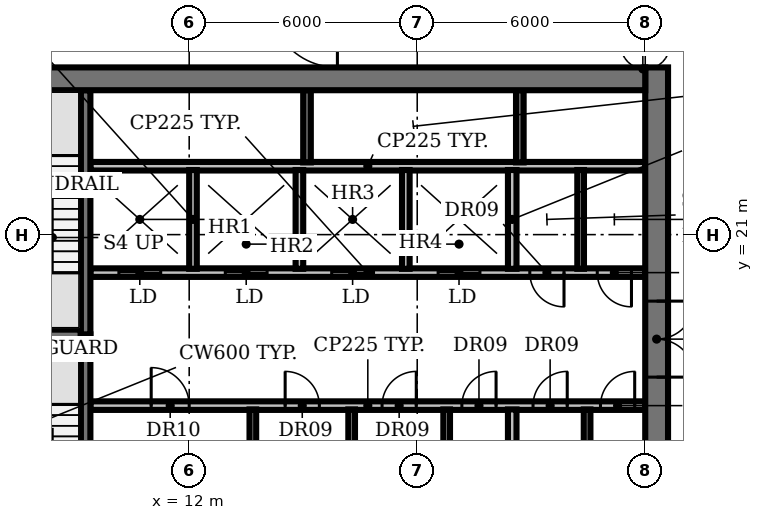
"""IFC4 building model, lengths in metres.
Left out: names, types, materials, properties, quantities, classifications, styles, units other than length and angle.
Written with IfcOpenShell. Run it as: python <this file> out.ifc"""

import sys

from ifc_helpers import new_model, si_unit, direction, frame, frame_2d, origin, place, context, subcontext, project, spatial, rectangle, extrude, element, fill, save


model = new_model("IFC4")
c1 = context("Model", 3, precision=1e-05, world=origin(), true_north=direction((0.0, 1.0)))
c2 = subcontext(c1, "Body", "Model", "MODEL_VIEW")
j1 = project(units=[si_unit("LENGTHUNIT", "METRE"), si_unit("PLANEANGLEUNIT", "RADIAN")], contexts=[c1])
p1 = place(None, origin())
s1 = spatial("IfcSite", under=j1, at=p1, CompositionType="ELEMENT")
p2 = place(p1, origin())
s2 = spatial("IfcBuilding", under=s1, at=p2, CompositionType="ELEMENT")
p3 = place(p2, frame((0.0, 0.0, 197.0)))
s3 = spatial("IfcBuildingStorey", under=s2, at=p3, CompositionType="ELEMENT", Elevation=197.0)
p4 = place(p3, frame((9.4, 16.5, 0.0), z_axis=(0.0, 0.0, 1.0), x_axis=(1.0, 0.0, 0.0)))
e1 = element("IfcWall", 1, at=p4, inside=s3, PredefinedType="PARTITIONING", context=c2, shape_type="SweptSolid", body=[
    extrude(rectangle(XDim=14.6, YDim=0.225, at=frame_2d((7.3, 0.0))), origin(), (0.0, 0.0, 1.0), 8.05),
])
p5 = place(p4, frame((1.6, 0.0, 0.0)))
e2 = element("IfcOpeningElement", 2, at=p5, cuts=e1, PredefinedType="OPENING", context=c2, shape_type="SweptSolid", body=[
    extrude(rectangle(XDim=1.0, YDim=2.1, at=frame_2d((0.5, 1.05))), frame((0.0, 0.123, 0.0), z_axis=(0.0, -1.0, 0.0), x_axis=(1.0, 0.0, 0.0)), (0.0, 0.0, 1.0), 0.245),
])
p6 = place(p4, frame((5.125, 0.0, 0.0)))
e3 = element("IfcOpeningElement", 3, at=p6, cuts=e1, PredefinedType="OPENING", context=c2, shape_type="SweptSolid", body=[
    extrude(rectangle(XDim=0.9, YDim=2.1, at=frame_2d((0.45, 1.05))), frame((0.0, 0.123, 0.0), z_axis=(0.0, -1.0, 0.0), x_axis=(1.0, 0.0, 0.0)), (0.0, 0.0, 1.0), 0.245),
])
p7 = place(p4, frame((7.675, 0.0, 0.0)))
e4 = element("IfcOpeningElement", 4, at=p7, cuts=e1, PredefinedType="OPENING", context=c2, shape_type="SweptSolid", body=[
    extrude(rectangle(XDim=0.9, YDim=2.1, at=frame_2d((0.45, 1.05))), frame((0.0, 0.123, 0.0), z_axis=(0.0, -1.0, 0.0), x_axis=(1.0, 0.0, 0.0)), (0.0, 0.0, 1.0), 0.245),
])
p8 = place(p4, frame((9.775, 0.0, 0.0)))
e5 = element("IfcOpeningElement", 5, at=p8, cuts=e1, PredefinedType="OPENING", context=c2, shape_type="SweptSolid", body=[
    extrude(rectangle(XDim=0.9, YDim=2.1, at=frame_2d((0.45, 1.05))), frame((0.0, 0.123, 0.0), z_axis=(0.0, -1.0, 0.0), x_axis=(1.0, 0.0, 0.0)), (0.0, 0.0, 1.0), 0.245),
])
p9 = place(p4, frame((11.647, 0.0, 0.0)))
e6 = element("IfcOpeningElement", 6, at=p9, cuts=e1, PredefinedType="OPENING", context=c2, shape_type="SweptSolid", body=[
    extrude(rectangle(XDim=0.9, YDim=2.1, at=frame_2d((0.45, 1.05))), frame((0.0, 0.123, 0.0), z_axis=(0.0, -1.0, 0.0), x_axis=(1.0, 0.0, 0.0)), (0.0, 0.0, 1.0), 0.245),
])
p10 = place(p4, frame((13.423, 0.0, 0.0)))
e7 = element("IfcOpeningElement", 7, at=p10, cuts=e1, PredefinedType="OPENING", context=c2, shape_type="SweptSolid", body=[
    extrude(rectangle(XDim=0.9, YDim=2.1, at=frame_2d((0.45, 1.05))), frame((0.0, 0.123, 0.0), z_axis=(0.0, -1.0, 0.0), x_axis=(1.0, 0.0, 0.0)), (0.0, 0.0, 1.0), 0.245),
])
p11 = place(p3, frame((6.0, 18.375, 0.0), z_axis=(0.0, 0.0, 1.0), x_axis=(1.0, 0.0, 0.0)))
e8 = element("IfcWall", 8, at=p11, inside=s3, PredefinedType="SHEAR", context=c2, shape_type="SweptSolid", body=[
    extrude(rectangle(XDim=3.15, YDim=0.25, at=frame_2d((1.575, 0.0))), origin(), (0.0, 0.0, 1.0), 8.05),
])
p12 = place(p3, frame((24.0, 20.0, 0.0), z_axis=(0.0, 0.0, 1.0), x_axis=(-1.0, 0.0, 0.0)))
e9 = element("IfcWall", 9, at=p12, inside=s3, PredefinedType="PARTITIONING", context=c2, shape_type="SweptSolid", body=[
    extrude(rectangle(XDim=14.6, YDim=0.225, at=frame_2d((7.3, 0.0))), origin(), (0.0, 0.0, 1.0), 8.05),
])
p13 = place(p12, frame((12.75, 0.0, 0.0)))
e10 = element("IfcOpeningElement", 10, at=p13, cuts=e9, PredefinedType="OPENING", context=c2, shape_type="SweptSolid", body=[
    extrude(rectangle(XDim=1.1, YDim=2.1, at=frame_2d((0.55, 1.05))), frame((0.0, 0.123, 0.0), z_axis=(0.0, -1.0, 0.0), x_axis=(1.0, 0.0, 0.0)), (0.0, 0.0, 1.0), 0.245),
])
p14 = place(p12, frame((9.95, 0.0, 0.0)))
e11 = element("IfcOpeningElement", 11, at=p14, cuts=e9, PredefinedType="OPENING", context=c2, shape_type="SweptSolid", body=[
    extrude(rectangle(XDim=1.1, YDim=2.1, at=frame_2d((0.55, 1.05))), frame((0.0, 0.123, 0.0), z_axis=(0.0, -1.0, 0.0), x_axis=(1.0, 0.0, 0.0)), (0.0, 0.0, 1.0), 0.245),
])
p15 = place(p12, frame((7.15, 0.0, 0.0)))
e12 = element("IfcOpeningElement", 12, at=p15, cuts=e9, PredefinedType="OPENING", context=c2, shape_type="SweptSolid", body=[
    extrude(rectangle(XDim=1.1, YDim=2.1, at=frame_2d((0.55, 1.05))), frame((0.0, 0.123, 0.0), z_axis=(0.0, -1.0, 0.0), x_axis=(1.0, 0.0, 0.0)), (0.0, 0.0, 1.0), 0.245),
])
p16 = place(p12, frame((4.35, 0.0, 0.0)))
e13 = element("IfcOpeningElement", 13, at=p16, cuts=e9, PredefinedType="OPENING", context=c2, shape_type="SweptSolid", body=[
    extrude(rectangle(XDim=1.1, YDim=2.1, at=frame_2d((0.55, 1.05))), frame((0.0, 0.123, 0.0), z_axis=(0.0, -1.0, 0.0), x_axis=(1.0, 0.0, 0.0)), (0.0, 0.0, 1.0), 0.245),
])
p17 = place(p12, frame((2.137, 0.0, 0.0)))
e14 = element("IfcOpeningElement", 14, at=p17, cuts=e9, PredefinedType="OPENING", context=c2, shape_type="SweptSolid", body=[
    extrude(rectangle(XDim=0.9, YDim=2.1, at=frame_2d((0.45, 1.05))), frame((0.0, 0.123, 0.0), z_axis=(0.0, -1.0, 0.0), x_axis=(1.0, 0.0, 0.0)), (0.0, 0.0, 1.0), 0.245),
])
p18 = place(p12, frame((0.363, 0.0, 0.0)))
e15 = element("IfcOpeningElement", 15, at=p18, cuts=e9, PredefinedType="OPENING", context=c2, shape_type="SweptSolid", body=[
    extrude(rectangle(XDim=0.9, YDim=2.1, at=frame_2d((0.45, 1.05))), frame((0.0, 0.123, 0.0), z_axis=(0.0, -1.0, 0.0), x_axis=(1.0, 0.0, 0.0)), (0.0, 0.0, 1.0), 0.245),
])
p19 = place(p3, frame((9.4, 22.8, 0.0), z_axis=(0.0, 0.0, 1.0), x_axis=(1.0, 0.0, 0.0)))
e16 = element("IfcWall", 16, at=p19, inside=s3, PredefinedType="PARTITIONING", context=c2, shape_type="SweptSolid", body=[
    extrude(rectangle(XDim=14.6, YDim=0.225, at=frame_2d((7.3, 0.0))), origin(), (0.0, 0.0, 1.0), 8.05),
])
p20 = place(p3, frame((9.275, 18.375, 0.0), z_axis=(0.0, 0.0, 1.0), x_axis=(0.0, -1.0, 0.0)))
e17 = element("IfcWall", 17, at=p20, inside=s3, PredefinedType="SHEAR", context=c2, shape_type="SweptSolid", body=[
    extrude(rectangle(XDim=6.55, YDim=0.25, at=frame_2d((3.275, 0.0))), origin(), (0.0, 0.0, 1.0), 8.05),
])
p21 = place(p20, frame((5.075, 0.0, 0.0)))
e18 = element("IfcOpeningElement", 18, at=p21, cuts=e17, PredefinedType="OPENING", context=c2, shape_type="SweptSolid", body=[
    extrude(rectangle(XDim=1.0, YDim=2.1, at=frame_2d((0.5, 1.05))), frame((0.0, 0.135, 0.0), z_axis=(0.0, -1.0, 0.0), x_axis=(1.0, 0.0, 0.0)), (0.0, 0.0, 1.0), 0.27),
])
p22 = place(p3, frame((9.275, 18.375, 0.0), z_axis=(0.0, 0.0, 1.0), x_axis=(0.0, 1.0, 0.0)))
e19 = element("IfcWall", 19, at=p22, inside=s3, PredefinedType="SHEAR", context=c2, shape_type="SweptSolid", body=[
    extrude(rectangle(XDim=6.425, YDim=0.25, at=frame_2d((3.212, 0.0))), origin(), (0.0, 0.0, 1.0), 8.05),
])
p23 = place(p3, frame((12.1, 20.1, 0.0), z_axis=(0.0, 0.0, 1.0), x_axis=(0.0, 1.0, 0.0)))
e20 = element("IfcWall", 20, at=p23, inside=s3, PredefinedType="SOLIDWALL", context=c2, shape_type="SweptSolid", body=[
    extrude(rectangle(XDim=2.6, YDim=0.2, at=frame_2d((1.3, 0.0))), origin(), (0.0, 0.0, 1.0), 8.05),
])
p24 = place(p3, frame((13.675, 13.8, 0.0), z_axis=(0.0, 0.0, 1.0), x_axis=(0.0, 1.0, 0.0)))
e21 = element("IfcWall", 21, at=p24, inside=s3, PredefinedType="PARTITIONING", context=c2, shape_type="SweptSolid", body=[
    extrude(rectangle(XDim=2.6, YDim=0.175, at=frame_2d((1.3, 0.0))), origin(), (0.0, 0.0, 1.0), 8.05),
])
p25 = place(p3, frame((14.9, 20.1, 0.0), z_axis=(0.0, 0.0, 1.0), x_axis=(0.0, 1.0, 0.0)))
e22 = element("IfcWall", 22, at=p25, inside=s3, PredefinedType="SOLIDWALL", context=c2, shape_type="SweptSolid", body=[
    extrude(rectangle(XDim=2.6, YDim=0.2, at=frame_2d((1.3, 0.0))), origin(), (0.0, 0.0, 1.0), 8.05),
])
p26 = place(p3, frame((15.1, 22.9, 0.0), z_axis=(0.0, 0.0, 1.0), x_axis=(0.0, 1.0, 0.0)))
e23 = element("IfcWall", 23, at=p26, inside=s3, PredefinedType="SHEAR", context=c2, shape_type="SweptSolid", body=[
    extrude(rectangle(XDim=1.9, YDim=0.2, at=frame_2d((0.95, 0.0))), origin(), (0.0, 0.0, 1.0), 8.05),
])
p27 = place(p3, frame((16.275, 13.8, 0.0), z_axis=(0.0, 0.0, 1.0), x_axis=(0.0, 1.0, 0.0)))
e24 = element("IfcWall", 24, at=p27, inside=s3, PredefinedType="PARTITIONING", context=c2, shape_type="SweptSolid", body=[
    extrude(rectangle(XDim=2.6, YDim=0.175, at=frame_2d((1.3, 0.0))), origin(), (0.0, 0.0, 1.0), 8.05),
])
p28 = place(p3, frame((17.7, 20.1, 0.0), z_axis=(0.0, 0.0, 1.0), x_axis=(0.0, 1.0, 0.0)))
e25 = element("IfcWall", 25, at=p28, inside=s3, PredefinedType="SOLIDWALL", context=c2, shape_type="SweptSolid", body=[
    extrude(rectangle(XDim=2.6, YDim=0.2, at=frame_2d((1.3, 0.0))), origin(), (0.0, 0.0, 1.0), 8.05),
])
p29 = place(p3, frame((18.775, 13.8, 0.0), z_axis=(0.0, 0.0, 1.0), x_axis=(0.0, 1.0, 0.0)))
e26 = element("IfcWall", 26, at=p29, inside=s3, PredefinedType="PARTITIONING", context=c2, shape_type="SweptSolid", body=[
    extrude(rectangle(XDim=2.6, YDim=0.175, at=frame_2d((1.3, 0.0))), origin(), (0.0, 0.0, 1.0), 8.05),
])
for number, where, z_axis, x_axis in (
    (27, (20.5, 13.8, 0.0), (0.0, 0.0, 1.0), (0.0, 1.0, 0.0)),
    (28, (20.5, 20.1, 0.0), (0.0, 0.0, 1.0), (0.0, 1.0, 0.0)),
):
    element("IfcWall", number, at=place(p3, frame(where, z_axis=z_axis, x_axis=x_axis)), inside=s3, PredefinedType="PARTITIONING", context=c2, shape_type="SweptSolid", body=[
        extrude(rectangle(XDim=2.6, YDim=0.225, at=frame_2d((1.3, 0.0))), origin(), (0.0, 0.0, 1.0), 8.05),
    ])
p30 = place(p3, frame((20.7, 22.9, 0.0), z_axis=(0.0, 0.0, 1.0), x_axis=(0.0, 1.0, 0.0)))
e29 = element("IfcWall", 29, at=p30, inside=s3, PredefinedType="SHEAR", context=c2, shape_type="SweptSolid", body=[
    extrude(rectangle(XDim=1.9, YDim=0.2, at=frame_2d((0.95, 0.0))), origin(), (0.0, 0.0, 1.0), 8.05),
])
for number, where, z_axis, x_axis in (
    (30, (22.3, 20.1, 0.0), (0.0, 0.0, 1.0), (0.0, 1.0, 0.0)),
    (31, (22.47, 13.8, 0.0), (0.0, 0.0, 1.0), (0.0, 1.0, 0.0)),
):
    element("IfcWall", number, at=place(p3, frame(where, z_axis=z_axis, x_axis=x_axis)), inside=s3, PredefinedType="PARTITIONING", context=c2, shape_type="SweptSolid", body=[
        extrude(rectangle(XDim=2.6, YDim=0.175, at=frame_2d((1.3, 0.0))), origin(), (0.0, 0.0, 1.0), 8.05),
    ])
p31 = place(p3, frame((24.3, 25.4, 0.0), z_axis=(0.0, 0.0, 1.0), x_axis=(0.0, -1.0, 0.0)))
e32 = element("IfcWall", 32, at=p31, inside=s3, PredefinedType="SHEAR", context=c2, shape_type="SweptSolid", body=[
    extrude(rectangle(XDim=20.6, YDim=0.6, at=frame_2d((10.3, 0.0))), origin(), (0.0, 0.0, 1.0), 8.05),
])
p32 = place(p31, frame((18.25, 0.0, 0.0)))
e33 = element("IfcOpeningElement", 33, at=p32, cuts=e32, PredefinedType="OPENING", context=c2, shape_type="SweptSolid", body=[
    extrude(rectangle(XDim=1.5, YDim=2.1, at=frame_2d((0.75, 1.05))), frame((0.0, 0.31, 0.0), z_axis=(0.0, -1.0, 0.0), x_axis=(1.0, 0.0, 0.0)), (0.0, 0.0, 1.0), 0.62),
])
p33 = place(p31, frame((12.15, 0.0, 0.0)))
e34 = element("IfcOpeningElement", 34, at=p33, cuts=e32, PredefinedType="OPENING", context=c2, shape_type="SweptSolid", body=[
    extrude(rectangle(XDim=0.9, YDim=2.1, at=frame_2d((0.45, 1.05))), frame((0.0, 0.31, 0.0), z_axis=(0.0, -1.0, 0.0), x_axis=(1.0, 0.0, 0.0)), (0.0, 0.0, 1.0), 0.62),
])
p34 = place(p31, frame((6.15, 0.0, 0.0)))
e35 = element("IfcOpeningElement", 35, at=p34, cuts=e32, PredefinedType="OPENING", context=c2, shape_type="SweptSolid", body=[
    extrude(rectangle(XDim=2.0, YDim=2.1, at=frame_2d((1.0, 1.05))), frame((0.0, 0.31, 0.0), z_axis=(0.0, -1.0, 0.0), x_axis=(1.0, 0.0, 0.0)), (0.0, 0.0, 1.0), 0.62),
])
p35 = place(p3, frame((6.0, 25.1, 0.0), z_axis=(0.0, 0.0, 1.0), x_axis=(1.0, 0.0, 0.0)))
e36 = element("IfcWall", 36, at=p35, inside=s3, PredefinedType="SHEAR", context=c2, shape_type="SweptSolid", body=[
    extrude(rectangle(XDim=18.0, YDim=0.6, at=frame_2d((9.0, 0.0))), origin(), (0.0, 0.0, 1.0), 8.05),
])
p36 = place(p5, origin())
e37 = element("IfcDoor", 37, at=p36, inside=s3, OperationType="SINGLE_SWING_LEFT", PredefinedType="DOOR", context=c2, shape_type="SweptSolid", body=[
    extrude(rectangle(XDim=1.0, YDim=2.1, at=frame_2d((0.5, 1.05))), frame((0.0, 0.025, 0.0), z_axis=(0.0, -1.0, 0.0), x_axis=(1.0, 0.0, 0.0)), (0.0, 0.0, 1.0), 0.05),
])
fill(e2, e37)
p37 = place(p6, origin())
e38 = element("IfcDoor", 38, at=p37, inside=s3, OperationType="SINGLE_SWING_LEFT", PredefinedType="DOOR", context=c2, shape_type="SweptSolid", body=[
    extrude(rectangle(XDim=0.9, YDim=2.1, at=frame_2d((0.45, 1.05))), frame((0.0, 0.025, 0.0), z_axis=(0.0, -1.0, 0.0), x_axis=(1.0, 0.0, 0.0)), (0.0, 0.0, 1.0), 0.05),
])
fill(e3, e38)
p38 = place(p7, origin())
e39 = element("IfcDoor", 39, at=p38, inside=s3, OperationType="SINGLE_SWING_RIGHT", PredefinedType="DOOR", context=c2, shape_type="SweptSolid", body=[
    extrude(rectangle(XDim=0.9, YDim=2.1, at=frame_2d((0.45, 1.05))), frame((0.0, 0.025, 0.0), z_axis=(0.0, -1.0, 0.0), x_axis=(1.0, 0.0, 0.0)), (0.0, 0.0, 1.0), 0.05),
])
fill(e4, e39)
p39 = place(p8, origin())
e40 = element("IfcDoor", 40, at=p39, inside=s3, OperationType="SINGLE_SWING_RIGHT", PredefinedType="DOOR", context=c2, shape_type="SweptSolid", body=[
    extrude(rectangle(XDim=0.9, YDim=2.1, at=frame_2d((0.45, 1.05))), frame((0.0, 0.025, 0.0), z_axis=(0.0, -1.0, 0.0), x_axis=(1.0, 0.0, 0.0)), (0.0, 0.0, 1.0), 0.05),
])
fill(e5, e40)
p40 = place(p9, origin())
e41 = element("IfcDoor", 41, at=p40, inside=s3, OperationType="SINGLE_SWING_RIGHT", PredefinedType="DOOR", context=c2, shape_type="SweptSolid", body=[
    extrude(rectangle(XDim=0.9, YDim=2.1, at=frame_2d((0.45, 1.05))), frame((0.0, 0.025, 0.0), z_axis=(0.0, -1.0, 0.0), x_axis=(1.0, 0.0, 0.0)), (0.0, 0.0, 1.0), 0.05),
])
fill(e6, e41)
p41 = place(p10, origin())
e42 = element("IfcDoor", 42, at=p41, inside=s3, OperationType="SINGLE_SWING_RIGHT", PredefinedType="DOOR", context=c2, shape_type="SweptSolid", body=[
    extrude(rectangle(XDim=0.9, YDim=2.1, at=frame_2d((0.45, 1.05))), frame((0.0, 0.025, 0.0), z_axis=(0.0, -1.0, 0.0), x_axis=(1.0, 0.0, 0.0)), (0.0, 0.0, 1.0), 0.05),
])
fill(e7, e42)
p42 = place(p13, origin())
e43 = element("IfcDoor", 43, at=p42, inside=s3, OperationType="DOUBLE_DOOR_SLIDING", PredefinedType="DOOR", context=c2, shape_type="SweptSolid", body=[
    extrude(rectangle(XDim=1.1, YDim=2.1, at=frame_2d((0.55, 1.05))), frame((0.0, 0.025, 0.0), z_axis=(0.0, -1.0, 0.0), x_axis=(1.0, 0.0, 0.0)), (0.0, 0.0, 1.0), 0.05),
])
fill(e10, e43)
p43 = place(p14, origin())
e44 = element("IfcDoor", 44, at=p43, inside=s3, OperationType="DOUBLE_DOOR_SLIDING", PredefinedType="DOOR", context=c2, shape_type="SweptSolid", body=[
    extrude(rectangle(XDim=1.1, YDim=2.1, at=frame_2d((0.55, 1.05))), frame((0.0, 0.025, 0.0), z_axis=(0.0, -1.0, 0.0), x_axis=(1.0, 0.0, 0.0)), (0.0, 0.0, 1.0), 0.05),
])
fill(e11, e44)
p44 = place(p15, origin())
e45 = element("IfcDoor", 45, at=p44, inside=s3, OperationType="DOUBLE_DOOR_SLIDING", PredefinedType="DOOR", context=c2, shape_type="SweptSolid", body=[
    extrude(rectangle(XDim=1.1, YDim=2.1, at=frame_2d((0.55, 1.05))), frame((0.0, 0.025, 0.0), z_axis=(0.0, -1.0, 0.0), x_axis=(1.0, 0.0, 0.0)), (0.0, 0.0, 1.0), 0.05),
])
fill(e12, e45)
p45 = place(p16, origin())
e46 = element("IfcDoor", 46, at=p45, inside=s3, OperationType="DOUBLE_DOOR_SLIDING", PredefinedType="DOOR", context=c2, shape_type="SweptSolid", body=[
    extrude(rectangle(XDim=1.1, YDim=2.1, at=frame_2d((0.55, 1.05))), frame((0.0, 0.025, 0.0), z_axis=(0.0, -1.0, 0.0), x_axis=(1.0, 0.0, 0.0)), (0.0, 0.0, 1.0), 0.05),
])
fill(e13, e46)
p46 = place(p17, origin())
e47 = element("IfcDoor", 47, at=p46, inside=s3, OperationType="SINGLE_SWING_LEFT", PredefinedType="DOOR", context=c2, shape_type="SweptSolid", body=[
    extrude(rectangle(XDim=0.9, YDim=2.1, at=frame_2d((0.45, 1.05))), frame((0.0, 0.025, 0.0), z_axis=(0.0, -1.0, 0.0), x_axis=(1.0, 0.0, 0.0)), (0.0, 0.0, 1.0), 0.05),
])
fill(e14, e47)
p47 = place(p18, origin())
e48 = element("IfcDoor", 48, at=p47, inside=s3, OperationType="SINGLE_SWING_LEFT", PredefinedType="DOOR", context=c2, shape_type="SweptSolid", body=[
    extrude(rectangle(XDim=0.9, YDim=2.1, at=frame_2d((0.45, 1.05))), frame((0.0, 0.025, 0.0), z_axis=(0.0, -1.0, 0.0), x_axis=(1.0, 0.0, 0.0)), (0.0, 0.0, 1.0), 0.05),
])
fill(e15, e48)
p48 = place(p34, origin())
e49 = element("IfcDoor", 49, at=p48, inside=s3, OperationType="DOUBLE_DOOR_SINGLE_SWING", PredefinedType="DOOR", context=c2, shape_type="SweptSolid", body=[
    extrude(rectangle(XDim=2.0, YDim=2.1, at=frame_2d((1.0, 1.05))), frame((0.0, 0.025, 0.0), z_axis=(0.0, -1.0, 0.0), x_axis=(1.0, 0.0, 0.0)), (0.0, 0.0, 1.0), 0.05),
])
fill(e35, e49)
save(model, sys.argv[1])
